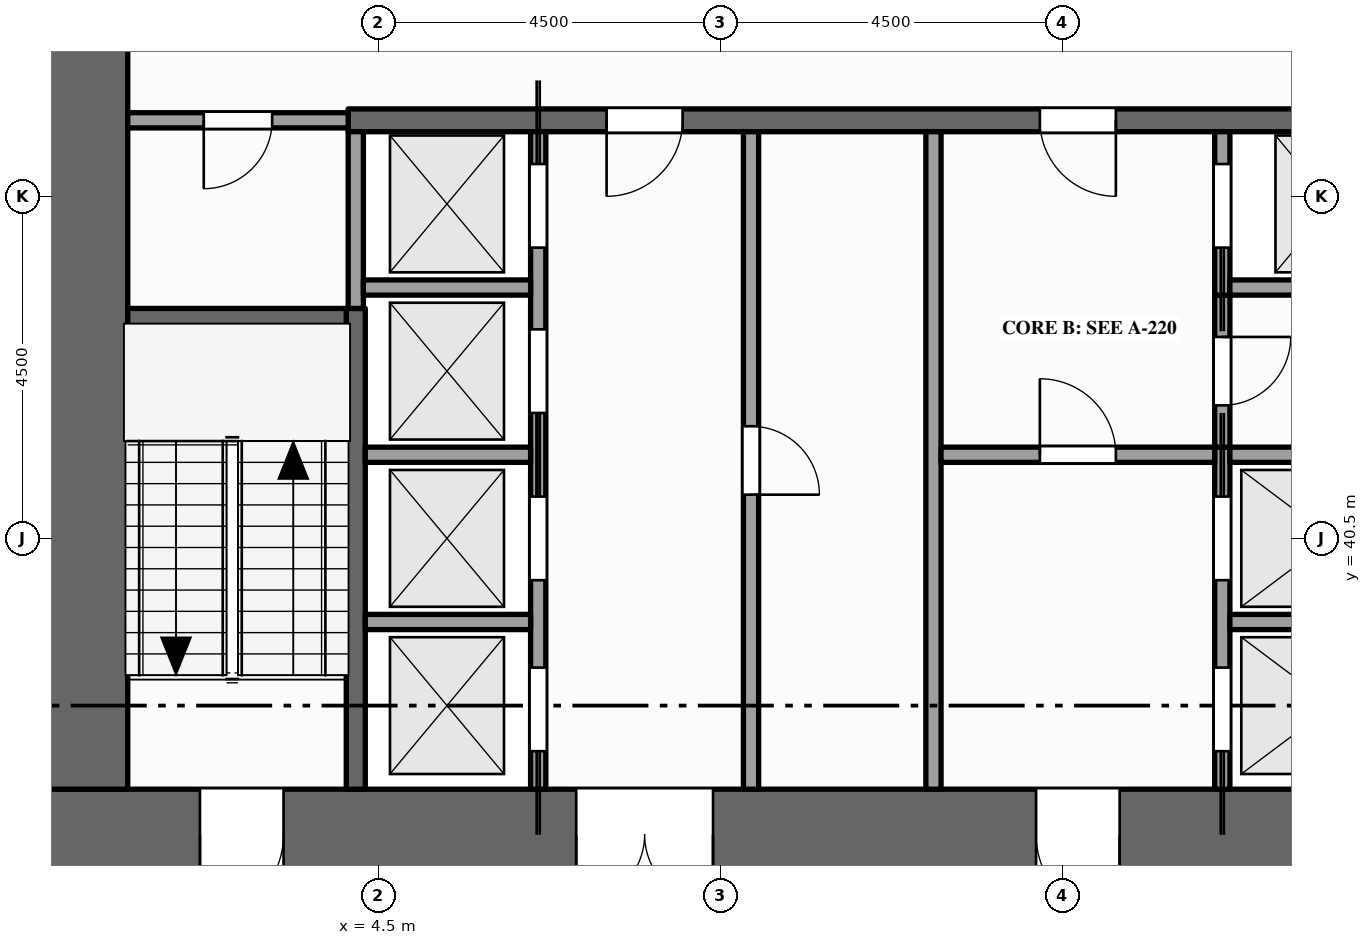
"""IFC4 building model, lengths in metres.
Left out: names, types, materials, properties, quantities, classifications, styles, units other than length and angle.
Written with IfcOpenShell. Run it as: python <this file> out.ifc"""

import sys

from ifc_helpers import new_model, si_unit, direction, frame, frame_2d, origin, place, context, subcontext, project, spatial, rectangle, extrude, element, fill, save


model = new_model("IFC4")
c1 = context("Model", 3, precision=1e-05, world=origin(), true_north=direction((0.0, 1.0)))
c2 = subcontext(c1, "Body", "Model", "MODEL_VIEW")
j1 = project(units=[si_unit("LENGTHUNIT", "METRE"), si_unit("PLANEANGLEUNIT", "RADIAN")], contexts=[c1])
p1 = place(None, origin())
s1 = spatial("IfcSite", under=j1, at=p1, CompositionType="ELEMENT")
p2 = place(p1, origin())
s2 = spatial("IfcBuilding", under=s1, at=p2, CompositionType="ELEMENT")
p3 = place(p2, frame((0.0, 0.0, 115.0)))
s3 = spatial("IfcBuildingStorey", under=s2, at=p3, CompositionType="ELEMENT", Elevation=115.0)
p4 = place(p3, frame((0.0, 36.6, -0.15), z_axis=(0.0, 0.0, 1.0), x_axis=(1.0, 0.0, 0.0)))
e1 = element("IfcWall", 1, at=p4, inside=s3, PredefinedType="SHEAR", context=c2, shape_type="SweptSolid", body=[
    extrude(rectangle(XDim=22.5, YDim=1.2, at=frame_2d((11.25, 0.0))), origin(), (0.0, 0.0, 1.0), 4.0),
])
p5 = place(p4, frame((7.1, 0.0, 0.15)))
e2 = element("IfcOpeningElement", 2, at=p5, cuts=e1, PredefinedType="OPENING", context=c2, shape_type="SweptSolid", body=[
    extrude(rectangle(XDim=1.8, YDim=2.1, at=frame_2d((0.9, 1.05))), frame((0.0, 0.61, 0.0), z_axis=(0.0, -1.0, 0.0), x_axis=(1.0, 0.0, 0.0)), (0.0, 0.0, 1.0), 1.22),
])
p6 = place(p4, frame((13.15, 0.0, 0.15)))
e3 = element("IfcOpeningElement", 3, at=p6, cuts=e1, PredefinedType="OPENING", context=c2, shape_type="SweptSolid", body=[
    extrude(rectangle(XDim=1.1, YDim=2.1, at=frame_2d((0.55, 1.05))), frame((0.0, 0.61, 0.0), z_axis=(0.0, -1.0, 0.0), x_axis=(1.0, 0.0, 0.0)), (0.0, 0.0, 1.0), 1.22),
])
p7 = place(p4, frame((2.15, 0.0, 0.15)))
e4 = element("IfcOpeningElement", 4, at=p7, cuts=e1, PredefinedType="OPENING", context=c2, shape_type="SweptSolid", body=[
    extrude(rectangle(XDim=1.1, YDim=2.1, at=frame_2d((0.55, 1.05))), frame((0.0, 0.61, 0.0), z_axis=(0.0, -1.0, 0.0), x_axis=(1.0, 0.0, 0.0)), (0.0, 0.0, 1.0), 1.22),
])
p8 = place(p4, frame((19.35, 0.0, 0.15)))
e5 = element("IfcOpeningElement", 5, at=p8, cuts=e1, PredefinedType="OPENING", context=c2, shape_type="SweptSolid", body=[
    extrude(rectangle(XDim=1.1, YDim=2.1, at=frame_2d((0.55, 1.05))), frame((0.0, 0.61, 0.0), z_axis=(0.0, -1.0, 0.0), x_axis=(1.0, 0.0, 0.0)), (0.0, 0.0, 1.0), 1.22),
])
p9 = place(p3, frame((0.6, 37.2, -0.15), z_axis=(0.0, 0.0, 1.0), x_axis=(0.0, 1.0, 0.0)))
e6 = element("IfcWall", 6, at=p9, inside=s3, PredefinedType="SHEAR", context=c2, shape_type="SweptSolid", body=[
    extrude(rectangle(XDim=11.1, YDim=1.2, at=frame_2d((5.55, 0.0))), origin(), (0.0, 0.0, 1.0), 4.0),
])
p10 = place(p3, frame((4.2, 37.2, 0.0), z_axis=(0.0, 0.0, 1.0), x_axis=(0.0, 1.0, 0.0)))
e7 = element("IfcWall", 7, at=p10, inside=s3, PredefinedType="SHEAR", context=c2, shape_type="SweptSolid", body=[
    extrude(rectangle(XDim=6.325, YDim=0.25, at=frame_2d((3.163, 0.0))), origin(), (0.0, 0.0, 1.0), 3.85),
])
p11 = place(p3, frame((4.2, 43.525, 0.0), z_axis=(0.0, 0.0, 1.0), x_axis=(0.0, 1.0, 0.0)))
e8 = element("IfcWall", 8, at=p11, inside=s3, PredefinedType="SOLIDWALL", context=c2, shape_type="SweptSolid", body=[
    extrude(rectangle(XDim=2.325, YDim=0.2, at=frame_2d((1.163, 0.0))), origin(), (0.0, 0.0, 1.0), 3.85),
])
p12 = place(p3, frame((6.6, 37.2, 0.0), z_axis=(0.0, 0.0, 1.0), x_axis=(0.0, 1.0, 0.0)))
e9 = element("IfcWall", 9, at=p12, inside=s3, PredefinedType="SOLIDWALL", context=c2, shape_type="SweptSolid", body=[
    extrude(rectangle(XDim=8.65, YDim=0.2, at=frame_2d((4.325, 0.0))), origin(), (0.0, 0.0, 1.0), 3.85),
])
p13 = place(p12, frame((0.5, 0.0, 0.012)))
e10 = element("IfcOpeningElement", 10, at=p13, cuts=e9, PredefinedType="OPENING", context=c2, shape_type="SweptSolid", body=[
    extrude(rectangle(XDim=1.1, YDim=2.1, at=frame_2d((0.55, 1.05))), frame((0.0, 0.11, 0.0), z_axis=(0.0, -1.0, 0.0), x_axis=(1.0, 0.0, 0.0)), (0.0, 0.0, 1.0), 0.22),
])
p14 = place(p12, frame((2.75, 0.0, 0.012)))
e11 = element("IfcOpeningElement", 11, at=p14, cuts=e9, PredefinedType="OPENING", context=c2, shape_type="SweptSolid", body=[
    extrude(rectangle(XDim=1.1, YDim=2.1, at=frame_2d((0.55, 1.05))), frame((0.0, 0.11, 0.0), z_axis=(0.0, -1.0, 0.0), x_axis=(1.0, 0.0, 0.0)), (0.0, 0.0, 1.0), 0.22),
])
p15 = place(p12, frame((4.95, 0.0, 0.012)))
e12 = element("IfcOpeningElement", 12, at=p15, cuts=e9, PredefinedType="OPENING", context=c2, shape_type="SweptSolid", body=[
    extrude(rectangle(XDim=1.1, YDim=2.1, at=frame_2d((0.55, 1.05))), frame((0.0, 0.11, 0.0), z_axis=(0.0, -1.0, 0.0), x_axis=(1.0, 0.0, 0.0)), (0.0, 0.0, 1.0), 0.22),
])
p16 = place(p12, frame((7.125, 0.0, 0.012)))
e13 = element("IfcOpeningElement", 13, at=p16, cuts=e9, PredefinedType="OPENING", context=c2, shape_type="SweptSolid", body=[
    extrude(rectangle(XDim=1.1, YDim=2.1, at=frame_2d((0.55, 1.05))), frame((0.0, 0.11, 0.0), z_axis=(0.0, -1.0, 0.0), x_axis=(1.0, 0.0, 0.0)), (0.0, 0.0, 1.0), 0.22),
])
p17 = place(p3, frame((9.4, 37.2, 0.0), z_axis=(0.0, 0.0, 1.0), x_axis=(0.0, 1.0, 0.0)))
e14 = element("IfcWall", 14, at=p17, inside=s3, PredefinedType="PARTITIONING", context=c2, shape_type="SweptSolid", body=[
    extrude(rectangle(XDim=8.65, YDim=0.2, at=frame_2d((4.325, 0.0))), origin(), (0.0, 0.0, 1.0), 3.85),
])
p18 = place(p17, frame((3.875, 0.0, 0.0)))
e15 = element("IfcOpeningElement", 15, at=p18, cuts=e14, PredefinedType="OPENING", context=c2, shape_type="SweptSolid", body=[
    extrude(rectangle(XDim=0.9, YDim=2.1, at=frame_2d((0.45, 1.05))), frame((0.0, 0.11, 0.0), z_axis=(0.0, -1.0, 0.0), x_axis=(1.0, 0.0, 0.0)), (0.0, 0.0, 1.0), 0.22),
])
p19 = place(p3, frame((11.8, 37.2, 0.0), z_axis=(0.0, 0.0, 1.0), x_axis=(0.0, 1.0, 0.0)))
e16 = element("IfcWall", 16, at=p19, inside=s3, PredefinedType="PARTITIONING", context=c2, shape_type="SweptSolid", body=[
    extrude(rectangle(XDim=8.65, YDim=0.2, at=frame_2d((4.325, 0.0))), origin(), (0.0, 0.0, 1.0), 3.85),
])
p20 = place(p3, frame((15.6, 37.2, 0.0), z_axis=(0.0, 0.0, 1.0), x_axis=(0.0, 1.0, 0.0)))
e17 = element("IfcWall", 17, at=p20, inside=s3, PredefinedType="SOLIDWALL", context=c2, shape_type="SweptSolid", body=[
    extrude(rectangle(XDim=4.5, YDim=0.2, at=frame_2d((2.25, 0.0))), origin(), (0.0, 0.0, 1.0), 3.85),
])
p21 = place(p20, frame((0.5, 0.0, 0.012)))
e18 = element("IfcOpeningElement", 18, at=p21, cuts=e17, PredefinedType="OPENING", context=c2, shape_type="SweptSolid", body=[
    extrude(rectangle(XDim=1.1, YDim=2.1, at=frame_2d((0.55, 1.05))), frame((0.0, 0.11, 0.0), z_axis=(0.0, -1.0, 0.0), x_axis=(1.0, 0.0, 0.0)), (0.0, 0.0, 1.0), 0.22),
])
p22 = place(p20, frame((2.75, 0.0, 0.012)))
e19 = element("IfcOpeningElement", 19, at=p22, cuts=e17, PredefinedType="OPENING", context=c2, shape_type="SweptSolid", body=[
    extrude(rectangle(XDim=1.1, YDim=2.1, at=frame_2d((0.55, 1.05))), frame((0.0, 0.11, 0.0), z_axis=(0.0, -1.0, 0.0), x_axis=(1.0, 0.0, 0.0)), (0.0, 0.0, 1.0), 0.22),
])
p23 = place(p3, frame((15.6, 41.7, 0.0), z_axis=(0.0, 0.0, 1.0), x_axis=(0.0, 1.0, 0.0)))
e20 = element("IfcWall", 20, at=p23, inside=s3, PredefinedType="PARTITIONING", context=c2, shape_type="SweptSolid", body=[
    extrude(rectangle(XDim=2.0, YDim=0.2, at=frame_2d((1.0, 0.0))), origin(), (0.0, 0.0, 1.0), 3.85),
])
p24 = place(p23, frame((0.55, 0.0, 0.0)))
e21 = element("IfcOpeningElement", 21, at=p24, cuts=e20, PredefinedType="OPENING", context=c2, shape_type="SweptSolid", body=[
    extrude(rectangle(XDim=0.9, YDim=2.1, at=frame_2d((0.45, 1.05))), frame((0.0, 0.11, 0.0), z_axis=(0.0, -1.0, 0.0), x_axis=(1.0, 0.0, 0.0)), (0.0, 0.0, 1.0), 0.22),
])
p25 = place(p3, frame((15.6, 43.7, 0.0), z_axis=(0.0, 0.0, 1.0), x_axis=(0.0, 1.0, 0.0)))
e22 = element("IfcWall", 22, at=p25, inside=s3, PredefinedType="SOLIDWALL", context=c2, shape_type="SweptSolid", body=[
    extrude(rectangle(XDim=2.15, YDim=0.2, at=frame_2d((1.075, 0.0))), origin(), (0.0, 0.0, 1.0), 3.85),
])
p26 = place(p25, frame((0.625, 0.0, 0.012)))
e23 = element("IfcOpeningElement", 23, at=p26, cuts=e22, PredefinedType="OPENING", context=c2, shape_type="SweptSolid", body=[
    extrude(rectangle(XDim=1.1, YDim=2.1, at=frame_2d((0.55, 1.05))), frame((0.0, 0.11, 0.0), z_axis=(0.0, -1.0, 0.0), x_axis=(1.0, 0.0, 0.0)), (0.0, 0.0, 1.0), 0.22),
])
p27 = place(p3, frame((4.325, 39.4, 0.0), z_axis=(0.0, 0.0, 1.0), x_axis=(1.0, 0.0, 0.0)))
e24 = element("IfcWall", 24, at=p27, inside=s3, PredefinedType="SOLIDWALL", context=c2, shape_type="SweptSolid", body=[
    extrude(rectangle(XDim=2.175, YDim=0.2, at=frame_2d((1.087, 0.0))), origin(), (0.0, 0.0, 1.0), 3.85),
])
p28 = place(p3, frame((15.7, 39.4, 0.0), z_axis=(0.0, 0.0, 1.0), x_axis=(1.0, 0.0, 0.0)))
e25 = element("IfcWall", 25, at=p28, inside=s3, PredefinedType="SOLIDWALL", context=c2, shape_type="SweptSolid", body=[
    extrude(rectangle(XDim=2.675, YDim=0.2, at=frame_2d((1.337, 0.0))), origin(), (0.0, 0.0, 1.0), 3.85),
])
p29 = place(p3, frame((4.325, 41.6, 0.0), z_axis=(0.0, 0.0, 1.0), x_axis=(1.0, 0.0, 0.0)))
e26 = element("IfcWall", 26, at=p29, inside=s3, PredefinedType="SOLIDWALL", context=c2, shape_type="SweptSolid", body=[
    extrude(rectangle(XDim=2.175, YDim=0.2, at=frame_2d((1.087, 0.0))), origin(), (0.0, 0.0, 1.0), 3.85),
])
p30 = place(p3, frame((11.9, 41.6, 0.0), z_axis=(0.0, 0.0, 1.0), x_axis=(1.0, 0.0, 0.0)))
e27 = element("IfcWall", 27, at=p30, inside=s3, PredefinedType="PARTITIONING", context=c2, shape_type="SweptSolid", body=[
    extrude(rectangle(XDim=3.6, YDim=0.2, at=frame_2d((1.8, 0.0))), origin(), (0.0, 0.0, 1.0), 3.85),
])
p31 = place(p30, frame((1.3, 0.0, 0.0)))
e28 = element("IfcOpeningElement", 28, at=p31, cuts=e27, PredefinedType="OPENING", context=c2, shape_type="SweptSolid", body=[
    extrude(rectangle(XDim=1.0, YDim=2.1, at=frame_2d((0.5, 1.05))), frame((0.0, 0.11, 0.0), z_axis=(0.0, -1.0, 0.0), x_axis=(1.0, 0.0, 0.0)), (0.0, 0.0, 1.0), 0.22),
])
p32 = place(p3, frame((15.7, 41.6, 0.0), z_axis=(0.0, 0.0, 1.0), x_axis=(1.0, 0.0, 0.0)))
e29 = element("IfcWall", 29, at=p32, inside=s3, PredefinedType="SOLIDWALL", context=c2, shape_type="SweptSolid", body=[
    extrude(rectangle(XDim=2.675, YDim=0.2, at=frame_2d((1.337, 0.0))), origin(), (0.0, 0.0, 1.0), 3.85),
])
p33 = place(p3, frame((1.2, 43.4, 0.0), z_axis=(0.0, 0.0, 1.0), x_axis=(1.0, 0.0, 0.0)))
e30 = element("IfcWall", 30, at=p33, inside=s3, PredefinedType="SHEAR", context=c2, shape_type="SweptSolid", body=[
    extrude(rectangle(XDim=2.875, YDim=0.25, at=frame_2d((1.438, 0.0))), origin(), (0.0, 0.0, 1.0), 3.85),
])
p34 = place(p3, frame((4.3, 43.8, 0.0), z_axis=(0.0, 0.0, 1.0), x_axis=(1.0, 0.0, 0.0)))
e31 = element("IfcWall", 31, at=p34, inside=s3, PredefinedType="SOLIDWALL", context=c2, shape_type="SweptSolid", body=[
    extrude(rectangle(XDim=2.2, YDim=0.2, at=frame_2d((1.1, 0.0))), origin(), (0.0, 0.0, 1.0), 3.85),
])
p35 = place(p3, frame((15.7, 43.8, 0.0), z_axis=(0.0, 0.0, 1.0), x_axis=(1.0, 0.0, 0.0)))
e32 = element("IfcWall", 32, at=p35, inside=s3, PredefinedType="SOLIDWALL", context=c2, shape_type="SweptSolid", body=[
    extrude(rectangle(XDim=2.7, YDim=0.2, at=frame_2d((1.35, 0.0))), origin(), (0.0, 0.0, 1.0), 3.85),
])
p36 = place(p3, frame((1.2, 46.0, 0.0), z_axis=(0.0, 0.0, 1.0), x_axis=(1.0, 0.0, 0.0)))
e33 = element("IfcWall", 33, at=p36, inside=s3, PredefinedType="PARTITIONING", context=c2, shape_type="SweptSolid", body=[
    extrude(rectangle(XDim=2.9, YDim=0.2, at=frame_2d((1.45, 0.0))), origin(), (0.0, 0.0, 1.0), 3.85),
])
p37 = place(p36, frame((1.0, 0.0, 0.0)))
e34 = element("IfcOpeningElement", 34, at=p37, cuts=e33, PredefinedType="OPENING", context=c2, shape_type="SweptSolid", body=[
    extrude(rectangle(XDim=0.9, YDim=2.1, at=frame_2d((0.45, 1.05))), frame((0.0, 0.11, 0.0), z_axis=(0.0, -1.0, 0.0), x_axis=(1.0, 0.0, 0.0)), (0.0, 0.0, 1.0), 0.22),
])
p38 = place(p3, frame((4.1, 46.0, 0.0), z_axis=(0.0, 0.0, 1.0), x_axis=(1.0, 0.0, 0.0)))
e35 = element("IfcWall", 35, at=p38, inside=s3, PredefinedType="SHEAR", context=c2, shape_type="SweptSolid", body=[
    extrude(rectangle(XDim=14.5, YDim=0.3, at=frame_2d((7.25, 0.0))), origin(), (0.0, 0.0, 1.0), 3.85),
])
p39 = place(p38, frame((3.4, 0.0, 0.0)))
e36 = element("IfcOpeningElement", 36, at=p39, cuts=e35, PredefinedType="OPENING", context=c2, shape_type="SweptSolid", body=[
    extrude(rectangle(XDim=1.0, YDim=2.1, at=frame_2d((0.5, 1.05))), frame((0.0, 0.16, 0.0), z_axis=(0.0, -1.0, 0.0), x_axis=(1.0, 0.0, 0.0)), (0.0, 0.0, 1.0), 0.32),
])
p40 = place(p38, frame((9.1, 0.0, 0.0)))
e37 = element("IfcOpeningElement", 37, at=p40, cuts=e35, PredefinedType="OPENING", context=c2, shape_type="SweptSolid", body=[
    extrude(rectangle(XDim=1.0, YDim=2.1, at=frame_2d((0.5, 1.05))), frame((0.0, 0.16, 0.0), z_axis=(0.0, -1.0, 0.0), x_axis=(1.0, 0.0, 0.0)), (0.0, 0.0, 1.0), 0.32),
])
p41 = place(p13, origin())
e38 = element("IfcDoor", 38, at=p41, inside=s3, OperationType="SLIDING_TO_LEFT", PredefinedType="DOOR", context=c2, shape_type="SweptSolid", body=[
    extrude(rectangle(XDim=1.1, YDim=2.1, at=frame_2d((0.55, 1.05))), frame((0.0, 0.025, 0.0), z_axis=(0.0, -1.0, 0.0), x_axis=(1.0, 0.0, 0.0)), (0.0, 0.0, 1.0), 0.05),
])
fill(e10, e38)
p42 = place(p14, origin())
e39 = element("IfcDoor", 39, at=p42, inside=s3, OperationType="SLIDING_TO_RIGHT", PredefinedType="DOOR", context=c2, shape_type="SweptSolid", body=[
    extrude(rectangle(XDim=1.1, YDim=2.1, at=frame_2d((0.55, 1.05))), frame((0.0, 0.025, 0.0), z_axis=(0.0, -1.0, 0.0), x_axis=(1.0, 0.0, 0.0)), (0.0, 0.0, 1.0), 0.05),
])
fill(e11, e39)
p43 = place(p15, origin())
e40 = element("IfcDoor", 40, at=p43, inside=s3, OperationType="SLIDING_TO_LEFT", PredefinedType="DOOR", context=c2, shape_type="SweptSolid", body=[
    extrude(rectangle(XDim=1.1, YDim=2.1, at=frame_2d((0.55, 1.05))), frame((0.0, 0.025, 0.0), z_axis=(0.0, -1.0, 0.0), x_axis=(1.0, 0.0, 0.0)), (0.0, 0.0, 1.0), 0.05),
])
fill(e12, e40)
p44 = place(p16, origin())
e41 = element("IfcDoor", 41, at=p44, inside=s3, OperationType="SLIDING_TO_RIGHT", PredefinedType="DOOR", context=c2, shape_type="SweptSolid", body=[
    extrude(rectangle(XDim=1.1, YDim=2.1, at=frame_2d((0.55, 1.05))), frame((0.0, 0.025, 0.0), z_axis=(0.0, -1.0, 0.0), x_axis=(1.0, 0.0, 0.0)), (0.0, 0.0, 1.0), 0.05),
])
fill(e13, e41)
p45 = place(p21, origin())
e42 = element("IfcDoor", 42, at=p45, inside=s3, OperationType="SLIDING_TO_LEFT", PredefinedType="DOOR", context=c2, shape_type="SweptSolid", body=[
    extrude(rectangle(XDim=1.1, YDim=2.1, at=frame_2d((0.55, 1.05))), frame((0.0, 0.025, 0.0), z_axis=(0.0, -1.0, 0.0), x_axis=(1.0, 0.0, 0.0)), (0.0, 0.0, 1.0), 0.05),
])
fill(e18, e42)
p46 = place(p22, origin())
e43 = element("IfcDoor", 43, at=p46, inside=s3, OperationType="SLIDING_TO_RIGHT", PredefinedType="DOOR", context=c2, shape_type="SweptSolid", body=[
    extrude(rectangle(XDim=1.1, YDim=2.1, at=frame_2d((0.55, 1.05))), frame((0.0, 0.025, 0.0), z_axis=(0.0, -1.0, 0.0), x_axis=(1.0, 0.0, 0.0)), (0.0, 0.0, 1.0), 0.05),
])
fill(e19, e43)
p47 = place(p26, origin())
e44 = element("IfcDoor", 44, at=p47, inside=s3, OperationType="SLIDING_TO_LEFT", PredefinedType="DOOR", context=c2, shape_type="SweptSolid", body=[
    extrude(rectangle(XDim=1.1, YDim=2.1, at=frame_2d((0.55, 1.05))), frame((0.0, 0.025, 0.0), z_axis=(0.0, -1.0, 0.0), x_axis=(1.0, 0.0, 0.0)), (0.0, 0.0, 1.0), 0.05),
])
fill(e23, e44)
p48 = place(p5, origin())
e45 = element("IfcDoor", 45, at=p48, inside=s3, OperationType="DOUBLE_DOOR_SINGLE_SWING", PredefinedType="DOOR", context=c2, shape_type="SweptSolid", body=[
    extrude(rectangle(XDim=1.8, YDim=2.1, at=frame_2d((0.9, 1.05))), frame((0.0, 0.025, 0.0), z_axis=(0.0, -1.0, 0.0), x_axis=(1.0, 0.0, 0.0)), (0.0, 0.0, 1.0), 0.05),
])
fill(e2, e45)
p49 = place(p39, origin())
e46 = element("IfcDoor", 46, at=p49, inside=s3, OperationType="SINGLE_SWING_LEFT", PredefinedType="DOOR", context=c2, shape_type="SweptSolid", body=[
    extrude(rectangle(XDim=1.0, YDim=2.1, at=frame_2d((0.5, 1.05))), frame((0.0, 0.025, 0.0), z_axis=(0.0, -1.0, 0.0), x_axis=(1.0, 0.0, 0.0)), (0.0, 0.0, 1.0), 0.05),
])
fill(e36, e46)
p50 = place(p6, origin())
e47 = element("IfcDoor", 47, at=p50, inside=s3, OperationType="SINGLE_SWING_RIGHT", PredefinedType="DOOR", context=c2, shape_type="SweptSolid", body=[
    extrude(rectangle(XDim=1.1, YDim=2.1, at=frame_2d((0.55, 1.05))), frame((0.0, 0.025, 0.0), z_axis=(0.0, -1.0, 0.0), x_axis=(1.0, 0.0, 0.0)), (0.0, 0.0, 1.0), 0.05),
])
fill(e3, e47)
p51 = place(p31, origin())
e48 = element("IfcDoor", 48, at=p51, inside=s3, OperationType="SINGLE_SWING_LEFT", PredefinedType="DOOR", context=c2, shape_type="SweptSolid", body=[
    extrude(rectangle(XDim=1.0, YDim=2.1, at=frame_2d((0.5, 1.05))), frame((0.0, 0.025, 0.0), z_axis=(0.0, -1.0, 0.0), x_axis=(1.0, 0.0, 0.0)), (0.0, 0.0, 1.0), 0.05),
])
fill(e28, e48)
p52 = place(p40, origin())
e49 = element("IfcDoor", 49, at=p52, inside=s3, OperationType="SINGLE_SWING_RIGHT", PredefinedType="DOOR", context=c2, shape_type="SweptSolid", body=[
    extrude(rectangle(XDim=1.0, YDim=2.1, at=frame_2d((0.5, 1.05))), frame((0.0, 0.025, 0.0), z_axis=(0.0, -1.0, 0.0), x_axis=(1.0, 0.0, 0.0)), (0.0, 0.0, 1.0), 0.05),
])
fill(e37, e49)
p53 = place(p7, origin())
e50 = element("IfcDoor", 50, at=p53, inside=s3, OperationType="SINGLE_SWING_LEFT", PredefinedType="DOOR", context=c2, shape_type="SweptSolid", body=[
    extrude(rectangle(XDim=1.1, YDim=2.1, at=frame_2d((0.55, 1.05))), frame((0.0, 0.025, 0.0), z_axis=(0.0, -1.0, 0.0), x_axis=(1.0, 0.0, 0.0)), (0.0, 0.0, 1.0), 0.05),
])
fill(e4, e50)
p54 = place(p37, origin())
e51 = element("IfcDoor", 51, at=p54, inside=s3, OperationType="SINGLE_SWING_LEFT", PredefinedType="DOOR", context=c2, shape_type="SweptSolid", body=[
    extrude(rectangle(XDim=0.9, YDim=2.1, at=frame_2d((0.45, 1.05))), frame((0.0, 0.025, 0.0), z_axis=(0.0, -1.0, 0.0), x_axis=(1.0, 0.0, 0.0)), (0.0, 0.0, 1.0), 0.05),
])
fill(e34, e51)
p55 = place(p18, origin())
e52 = element("IfcDoor", 52, at=p55, inside=s3, OperationType="SINGLE_SWING_LEFT", PredefinedType="DOOR", context=c2, shape_type="SweptSolid", body=[
    extrude(rectangle(XDim=0.9, YDim=2.1, at=frame_2d((0.45, 1.05))), frame((0.0, 0.025, 0.0), z_axis=(0.0, -1.0, 0.0), x_axis=(1.0, 0.0, 0.0)), (0.0, 0.0, 1.0), 0.05),
])
fill(e15, e52)
p56 = place(p24, origin())
e53 = element("IfcDoor", 53, at=p56, inside=s3, OperationType="SINGLE_SWING_RIGHT", PredefinedType="DOOR", context=c2, shape_type="SweptSolid", body=[
    extrude(rectangle(XDim=0.9, YDim=2.1, at=frame_2d((0.45, 1.05))), frame((0.0, 0.025, 0.0), z_axis=(0.0, -1.0, 0.0), x_axis=(1.0, 0.0, 0.0)), (0.0, 0.0, 1.0), 0.05),
])
fill(e21, e53)
save(model, sys.argv[1])
